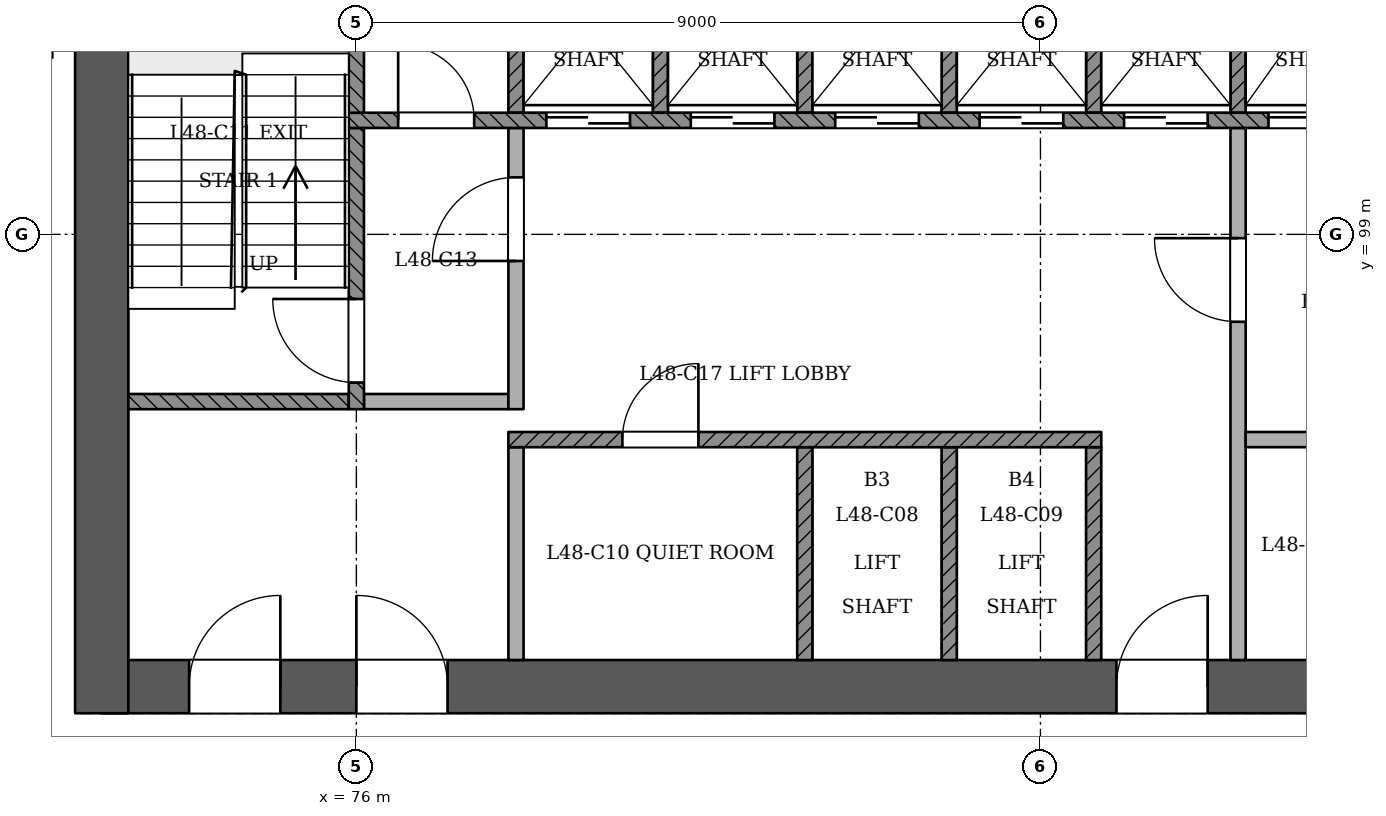
"""IFC4 building model, lengths in metres.
Left out: names, types, materials, properties, quantities, classifications, styles, units other than length and angle.
Written with IfcOpenShell. Run it as: python <this file> out.ifc"""

import sys

from ifc_helpers import new_model, si_unit, direction, frame, frame_2d, origin, place, context, subcontext, project, spatial, rectangle, extrude, element, fill, save


model = new_model("IFC4")
c1 = context("Model", 3, precision=1e-05, world=origin(), true_north=direction((0.0, 1.0)))
c2 = subcontext(c1, "Body", "Model", "MODEL_VIEW")
j1 = project(units=[si_unit("LENGTHUNIT", "METRE"), si_unit("PLANEANGLEUNIT", "RADIAN")], contexts=[c1])
p1 = place(None, origin())
s1 = spatial("IfcSite", under=j1, at=p1, CompositionType="ELEMENT")
p2 = place(p1, origin())
s2 = spatial("IfcBuilding", under=s1, at=p2, CompositionType="ELEMENT")
p3 = place(p2, frame((0.0, 0.0, 185.4)))
s3 = spatial("IfcBuildingStorey", under=s2, at=p3, CompositionType="ELEMENT", Elevation=185.4)
p4 = place(p3, frame((72.65, 93.05, 0.0), z_axis=(0.0, 0.0, 1.0), x_axis=(1.0, 0.0, 0.0)))
e1 = element("IfcWall", 1, at=p4, inside=s3, PredefinedType="SHEAR", context=c2, shape_type="SweptSolid", body=[
    extrude(rectangle(XDim=25.05, YDim=0.7, at=frame_2d((12.525, 0.0))), origin(), (0.0, 0.0, 1.0), 3.6),
])
p5 = place(p4, frame((1.15, 0.0, 0.0)))
e2 = element("IfcOpeningElement", 2, at=p5, cuts=e1, PredefinedType="OPENING", context=c2, shape_type="SweptSolid", body=[
    extrude(rectangle(XDim=1.2, YDim=2.1, at=frame_2d((0.6, 1.05))), frame((0.0, 0.36, 0.0), z_axis=(0.0, -1.0, 0.0), x_axis=(1.0, 0.0, 0.0)), (0.0, 0.0, 1.0), 0.721),
])
p6 = place(p4, frame((3.35, 0.0, 0.0)))
e3 = element("IfcOpeningElement", 3, at=p6, cuts=e1, PredefinedType="OPENING", context=c2, shape_type="SweptSolid", body=[
    extrude(rectangle(XDim=1.2, YDim=2.1, at=frame_2d((0.6, 1.05))), frame((0.0, 0.36, 0.0), z_axis=(0.0, -1.0, 0.0), x_axis=(1.0, 0.0, 0.0)), (0.0, 0.0, 1.0), 0.721),
])
p7 = place(p4, frame((13.35, 0.0, 0.0)))
e4 = element("IfcOpeningElement", 4, at=p7, cuts=e1, PredefinedType="OPENING", context=c2, shape_type="SweptSolid", body=[
    extrude(rectangle(XDim=1.2, YDim=2.1, at=frame_2d((0.6, 1.05))), frame((0.0, 0.36, 0.0), z_axis=(0.0, -1.0, 0.0), x_axis=(1.0, 0.0, 0.0)), (0.0, 0.0, 1.0), 0.721),
])
p8 = place(p4, frame((16.212, 0.0, 0.0)))
e5 = element("IfcOpeningElement", 5, at=p8, cuts=e1, PredefinedType="OPENING", context=c2, shape_type="SweptSolid", body=[
    extrude(rectangle(XDim=1.0, YDim=2.1, at=frame_2d((0.5, 1.05))), frame((0.0, 0.36, 0.0), z_axis=(0.0, -1.0, 0.0), x_axis=(1.0, 0.0, 0.0)), (0.0, 0.0, 1.0), 0.721),
])
p9 = place(p4, frame((19.65, 0.0, 0.0)))
e6 = element("IfcOpeningElement", 6, at=p9, cuts=e1, PredefinedType="OPENING", context=c2, shape_type="SweptSolid", body=[
    extrude(rectangle(XDim=1.0, YDim=2.1, at=frame_2d((0.5, 1.05))), frame((0.0, 0.36, 0.0), z_axis=(0.0, -1.0, 0.0), x_axis=(1.0, 0.0, 0.0)), (0.0, 0.0, 1.0), 0.721),
])
p10 = place(p4, frame((22.637, 0.0, 0.0)))
e7 = element("IfcOpeningElement", 7, at=p10, cuts=e1, PredefinedType="OPENING", context=c2, shape_type="SweptSolid", body=[
    extrude(rectangle(XDim=1.0, YDim=2.1, at=frame_2d((0.5, 1.05))), frame((0.0, 0.36, 0.0), z_axis=(0.0, -1.0, 0.0), x_axis=(1.0, 0.0, 0.0)), (0.0, 0.0, 1.0), 0.721),
])
p11 = place(p3, frame((72.65, 103.75, 0.0), z_axis=(0.0, 0.0, 1.0), x_axis=(0.0, -1.0, 0.0)))
e8 = element("IfcWall", 8, at=p11, inside=s3, PredefinedType="SHEAR", context=c2, shape_type="SweptSolid", body=[
    extrude(rectangle(XDim=11.05, YDim=0.7, at=frame_2d((5.525, 0.0))), origin(), (0.0, 0.0, 1.0), 3.6),
])
p12 = place(p3, frame((78.1, 93.4, 0.0), z_axis=(0.0, 0.0, 1.0), x_axis=(0.0, 1.0, 0.0)))
e9 = element("IfcWall", 9, at=p12, inside=s3, PredefinedType="PARTITIONING", context=c2, shape_type="SweptSolid", body=[
    extrude(rectangle(XDim=2.8, YDim=0.2, at=frame_2d((1.4, 0.0))), origin(), (0.0, 0.0, 1.0), 3.3),
])
for number, where, z_axis, x_axis in (
    (10, (81.9, 93.4, 0.0), (0.0, 0.0, 1.0), (0.0, 1.0, 0.0)),
    (11, (83.8, 93.4, 0.0), (0.0, 0.0, 1.0), (0.0, 1.0, 0.0)),
    (12, (85.7, 93.4, 0.0), (0.0, 0.0, 1.0), (0.0, 1.0, 0.0)),
):
    element("IfcWall", number, at=place(p3, frame(where, z_axis=z_axis, x_axis=x_axis)), inside=s3, PredefinedType="SOLIDWALL", context=c2, shape_type="SweptSolid", body=[
        extrude(rectangle(XDim=2.8, YDim=0.2, at=frame_2d((1.4, 0.0))), origin(), (0.0, 0.0, 1.0), 3.3),
    ])
p13 = place(p3, frame((87.6, 93.4, 0.0), z_axis=(0.0, 0.0, 1.0), x_axis=(0.0, 1.0, 0.0)))
e13 = element("IfcWall", 13, at=p13, inside=s3, PredefinedType="PARTITIONING", context=c2, shape_type="SweptSolid", body=[
    extrude(rectangle(XDim=7.0, YDim=0.2, at=frame_2d((3.5, 0.0))), origin(), (0.0, 0.0, 1.0), 3.3),
])
p14 = place(p13, frame((4.45, 0.0, 0.0)))
e14 = element("IfcOpeningElement", 14, at=p14, cuts=e13, PredefinedType="OPENING", context=c2, shape_type="SweptSolid", body=[
    extrude(rectangle(XDim=1.1, YDim=2.1, at=frame_2d((0.55, 1.05))), frame((0.0, 0.11, 0.0), z_axis=(0.0, -1.0, 0.0), x_axis=(1.0, 0.0, 0.0)), (0.0, 0.0, 1.0), 0.221),
])
p15 = place(p3, frame((78.0, 96.3, 0.0), z_axis=(0.0, 0.0, 1.0), x_axis=(1.0, 0.0, 0.0)))
e15 = element("IfcWall", 15, at=p15, inside=s3, PredefinedType="SOLIDWALL", context=c2, shape_type="SweptSolid", body=[
    extrude(rectangle(XDim=7.8, YDim=0.2, at=frame_2d((3.9, 0.0))), origin(), (0.0, 0.0, 1.0), 3.3),
])
p16 = place(p15, frame((1.5, 0.0, 0.0)))
e16 = element("IfcOpeningElement", 16, at=p16, cuts=e15, PredefinedType="OPENING", context=c2, shape_type="SweptSolid", body=[
    extrude(rectangle(XDim=1.0, YDim=2.1, at=frame_2d((0.5, 1.05))), frame((0.0, 0.11, 0.0), z_axis=(0.0, -1.0, 0.0), x_axis=(1.0, 0.0, 0.0)), (0.0, 0.0, 1.0), 0.221),
])
p17 = place(p3, frame((87.7, 96.3, 0.0), z_axis=(0.0, 0.0, 1.0), x_axis=(1.0, 0.0, 0.0)))
e17 = element("IfcWall", 17, at=p17, inside=s3, PredefinedType="PARTITIONING", context=c2, shape_type="SweptSolid", body=[
    extrude(rectangle(XDim=3.6, YDim=0.2, at=frame_2d((1.8, 0.0))), origin(), (0.0, 0.0, 1.0), 3.3),
])
p18 = place(p3, frame((73.0, 96.8, 0.0), z_axis=(0.0, 0.0, 1.0), x_axis=(1.0, 0.0, 0.0)))
e18 = element("IfcWall", 18, at=p18, inside=s3, PredefinedType="SOLIDWALL", context=c2, shape_type="SweptSolid", body=[
    extrude(rectangle(XDim=2.9, YDim=0.2, at=frame_2d((1.45, 0.0))), origin(), (0.0, 0.0, 1.0), 3.3),
])
p19 = place(p3, frame((76.0, 96.7, 0.0), z_axis=(0.0, 0.0, 1.0), x_axis=(0.0, 1.0, 0.0)))
e19 = element("IfcWall", 19, at=p19, inside=s3, PredefinedType="SOLIDWALL", context=c2, shape_type="SweptSolid", body=[
    extrude(rectangle(XDim=3.7, YDim=0.2, at=frame_2d((1.85, 0.0))), origin(), (0.0, 0.0, 1.0), 3.3),
])
p20 = place(p19, frame((0.35, 0.0, 0.0)))
e20 = element("IfcOpeningElement", 20, at=p20, cuts=e19, PredefinedType="OPENING", context=c2, shape_type="SweptSolid", body=[
    extrude(rectangle(XDim=1.1, YDim=2.1, at=frame_2d((0.55, 1.05))), frame((0.0, 0.11, 0.0), z_axis=(0.0, -1.0, 0.0), x_axis=(1.0, 0.0, 0.0)), (0.0, 0.0, 1.0), 0.221),
])
p21 = place(p3, frame((76.1, 96.8, 0.0), z_axis=(0.0, 0.0, 1.0), x_axis=(1.0, 0.0, 0.0)))
e21 = element("IfcWall", 21, at=p21, inside=s3, PredefinedType="PARTITIONING", context=c2, shape_type="SweptSolid", body=[
    extrude(rectangle(XDim=1.9, YDim=0.2, at=frame_2d((0.95, 0.0))), origin(), (0.0, 0.0, 1.0), 3.3),
])
p22 = place(p3, frame((78.1, 96.7, 0.0), z_axis=(0.0, 0.0, 1.0), x_axis=(0.0, 1.0, 0.0)))
e22 = element("IfcWall", 22, at=p22, inside=s3, PredefinedType="PARTITIONING", context=c2, shape_type="SweptSolid", body=[
    extrude(rectangle(XDim=3.7, YDim=0.2, at=frame_2d((1.85, 0.0))), origin(), (0.0, 0.0, 1.0), 3.3),
])
p23 = place(p22, frame((1.95, 0.0, 0.0)))
e23 = element("IfcOpeningElement", 23, at=p23, cuts=e22, PredefinedType="OPENING", context=c2, shape_type="SweptSolid", body=[
    extrude(rectangle(XDim=1.1, YDim=2.1, at=frame_2d((0.55, 1.05))), frame((0.0, 0.11, 0.0), z_axis=(0.0, -1.0, 0.0), x_axis=(1.0, 0.0, 0.0)), (0.0, 0.0, 1.0), 0.221),
])
p24 = place(p3, frame((75.9, 100.5, 0.0), z_axis=(0.0, 0.0, 1.0), x_axis=(1.0, 0.0, 0.0)))
e24 = element("IfcWall", 24, at=p24, inside=s3, PredefinedType="SOLIDWALL", context=c2, shape_type="SweptSolid", body=[
    extrude(rectangle(XDim=18.2, YDim=0.2, at=frame_2d((9.1, 0.0))), origin(), (0.0, 0.0, 1.0), 3.3),
])
p25 = place(p24, frame((2.6, 0.0, 0.0)))
e25 = element("IfcOpeningElement", 25, at=p25, cuts=e24, PredefinedType="OPENING", context=c2, shape_type="SweptSolid", body=[
    extrude(rectangle(XDim=1.1, YDim=2.1, at=frame_2d((0.55, 1.05))), frame((0.0, 0.11, 0.0), z_axis=(0.0, -1.0, 0.0), x_axis=(1.0, 0.0, 0.0)), (0.0, 0.0, 1.0), 0.221),
])
p26 = place(p24, frame((4.5, 0.0, 0.0)))
e26 = element("IfcOpeningElement", 26, at=p26, cuts=e24, PredefinedType="OPENING", context=c2, shape_type="SweptSolid", body=[
    extrude(rectangle(XDim=1.1, YDim=2.1, at=frame_2d((0.55, 1.05))), frame((0.0, 0.11, 0.0), z_axis=(0.0, -1.0, 0.0), x_axis=(1.0, 0.0, 0.0)), (0.0, 0.0, 1.0), 0.221),
])
p27 = place(p24, frame((6.4, 0.0, 0.0)))
e27 = element("IfcOpeningElement", 27, at=p27, cuts=e24, PredefinedType="OPENING", context=c2, shape_type="SweptSolid", body=[
    extrude(rectangle(XDim=1.1, YDim=2.1, at=frame_2d((0.55, 1.05))), frame((0.0, 0.11, 0.0), z_axis=(0.0, -1.0, 0.0), x_axis=(1.0, 0.0, 0.0)), (0.0, 0.0, 1.0), 0.221),
])
p28 = place(p24, frame((8.3, 0.0, 0.0)))
e28 = element("IfcOpeningElement", 28, at=p28, cuts=e24, PredefinedType="OPENING", context=c2, shape_type="SweptSolid", body=[
    extrude(rectangle(XDim=1.1, YDim=2.1, at=frame_2d((0.55, 1.05))), frame((0.0, 0.11, 0.0), z_axis=(0.0, -1.0, 0.0), x_axis=(1.0, 0.0, 0.0)), (0.0, 0.0, 1.0), 0.221),
])
p29 = place(p24, frame((10.2, 0.0, 0.0)))
e29 = element("IfcOpeningElement", 29, at=p29, cuts=e24, PredefinedType="OPENING", context=c2, shape_type="SweptSolid", body=[
    extrude(rectangle(XDim=1.1, YDim=2.1, at=frame_2d((0.55, 1.05))), frame((0.0, 0.11, 0.0), z_axis=(0.0, -1.0, 0.0), x_axis=(1.0, 0.0, 0.0)), (0.0, 0.0, 1.0), 0.221),
])
p30 = place(p24, frame((12.1, 0.0, 0.0)))
e30 = element("IfcOpeningElement", 30, at=p30, cuts=e24, PredefinedType="OPENING", context=c2, shape_type="SweptSolid", body=[
    extrude(rectangle(XDim=1.1, YDim=2.1, at=frame_2d((0.55, 1.05))), frame((0.0, 0.11, 0.0), z_axis=(0.0, -1.0, 0.0), x_axis=(1.0, 0.0, 0.0)), (0.0, 0.0, 1.0), 0.221),
])
p31 = place(p24, frame((14.0, 0.0, 0.0)))
e31 = element("IfcOpeningElement", 31, at=p31, cuts=e24, PredefinedType="OPENING", context=c2, shape_type="SweptSolid", body=[
    extrude(rectangle(XDim=1.1, YDim=2.1, at=frame_2d((0.55, 1.05))), frame((0.0, 0.11, 0.0), z_axis=(0.0, -1.0, 0.0), x_axis=(1.0, 0.0, 0.0)), (0.0, 0.0, 1.0), 0.221),
])
p32 = place(p24, frame((0.65, 0.0, 0.0)))
e32 = element("IfcOpeningElement", 32, at=p32, cuts=e24, PredefinedType="OPENING", context=c2, shape_type="SweptSolid", body=[
    extrude(rectangle(XDim=1.0, YDim=2.1, at=frame_2d((0.5, 1.05))), frame((0.0, 0.11, 0.0), z_axis=(0.0, -1.0, 0.0), x_axis=(1.0, 0.0, 0.0)), (0.0, 0.0, 1.0), 0.221),
])
p33 = place(p24, frame((16.3, 0.0, 0.0)))
e33 = element("IfcOpeningElement", 33, at=p33, cuts=e24, PredefinedType="OPENING", context=c2, shape_type="SweptSolid", body=[
    extrude(rectangle(XDim=1.0, YDim=2.1, at=frame_2d((0.5, 1.05))), frame((0.0, 0.11, 0.0), z_axis=(0.0, -1.0, 0.0), x_axis=(1.0, 0.0, 0.0)), (0.0, 0.0, 1.0), 0.221),
])
for number, where, z_axis, x_axis in (
    (34, (76.0, 100.6, 0.0), (0.0, 0.0, 1.0), (0.0, 1.0, 0.0)),
    (35, (78.1, 100.6, 0.0), (0.0, 0.0, 1.0), (0.0, 1.0, 0.0)),
    (36, (80.0, 100.6, 0.0), (0.0, 0.0, 1.0), (0.0, 1.0, 0.0)),
    (37, (81.9, 100.6, 0.0), (0.0, 0.0, 1.0), (0.0, 1.0, 0.0)),
    (38, (83.8, 100.6, 0.0), (0.0, 0.0, 1.0), (0.0, 1.0, 0.0)),
    (39, (85.7, 100.6, 0.0), (0.0, 0.0, 1.0), (0.0, 1.0, 0.0)),
    (40, (87.6, 100.6, 0.0), (0.0, 0.0, 1.0), (0.0, 1.0, 0.0)),
):
    element("IfcWall", number, at=place(p3, frame(where, z_axis=z_axis, x_axis=x_axis)), inside=s3, PredefinedType="SOLIDWALL", context=c2, shape_type="SweptSolid", body=[
        extrude(rectangle(XDim=2.8, YDim=0.2, at=frame_2d((1.4, 0.0))), origin(), (0.0, 0.0, 1.0), 3.3),
    ])
p34 = place(p25, origin())
e41 = element("IfcDoor", 41, at=p34, inside=s3, OperationType="SLIDING_TO_RIGHT", PredefinedType="NOTDEFINED", context=c2, shape_type="SweptSolid", body=[
    extrude(rectangle(XDim=1.1, YDim=2.1, at=frame_2d((0.55, 1.05))), frame((0.0, 0.025, 0.0), z_axis=(0.0, -1.0, 0.0), x_axis=(1.0, 0.0, 0.0)), (0.0, 0.0, 1.0), 0.05),
])
fill(e25, e41)
p35 = place(p26, origin())
e42 = element("IfcDoor", 42, at=p35, inside=s3, OperationType="SLIDING_TO_LEFT", PredefinedType="NOTDEFINED", context=c2, shape_type="SweptSolid", body=[
    extrude(rectangle(XDim=1.1, YDim=2.1, at=frame_2d((0.55, 1.05))), frame((0.0, 0.025, 0.0), z_axis=(0.0, -1.0, 0.0), x_axis=(1.0, 0.0, 0.0)), (0.0, 0.0, 1.0), 0.05),
])
fill(e26, e42)
p36 = place(p27, origin())
e43 = element("IfcDoor", 43, at=p36, inside=s3, OperationType="SLIDING_TO_RIGHT", PredefinedType="NOTDEFINED", context=c2, shape_type="SweptSolid", body=[
    extrude(rectangle(XDim=1.1, YDim=2.1, at=frame_2d((0.55, 1.05))), frame((0.0, 0.025, 0.0), z_axis=(0.0, -1.0, 0.0), x_axis=(1.0, 0.0, 0.0)), (0.0, 0.0, 1.0), 0.05),
])
fill(e27, e43)
p37 = place(p28, origin())
e44 = element("IfcDoor", 44, at=p37, inside=s3, OperationType="SLIDING_TO_LEFT", PredefinedType="NOTDEFINED", context=c2, shape_type="SweptSolid", body=[
    extrude(rectangle(XDim=1.1, YDim=2.1, at=frame_2d((0.55, 1.05))), frame((0.0, 0.025, 0.0), z_axis=(0.0, -1.0, 0.0), x_axis=(1.0, 0.0, 0.0)), (0.0, 0.0, 1.0), 0.05),
])
fill(e28, e44)
p38 = place(p29, origin())
e45 = element("IfcDoor", 45, at=p38, inside=s3, OperationType="SLIDING_TO_RIGHT", PredefinedType="NOTDEFINED", context=c2, shape_type="SweptSolid", body=[
    extrude(rectangle(XDim=1.1, YDim=2.1, at=frame_2d((0.55, 1.05))), frame((0.0, 0.025, 0.0), z_axis=(0.0, -1.0, 0.0), x_axis=(1.0, 0.0, 0.0)), (0.0, 0.0, 1.0), 0.05),
])
fill(e29, e45)
p39 = place(p30, origin())
e46 = element("IfcDoor", 46, at=p39, inside=s3, OperationType="SLIDING_TO_RIGHT", PredefinedType="NOTDEFINED", context=c2, shape_type="SweptSolid", body=[
    extrude(rectangle(XDim=1.1, YDim=2.1, at=frame_2d((0.55, 1.05))), frame((0.0, 0.025, 0.0), z_axis=(0.0, -1.0, 0.0), x_axis=(1.0, 0.0, 0.0)), (0.0, 0.0, 1.0), 0.05),
])
fill(e30, e46)
p40 = place(p20, origin())
e47 = element("IfcDoor", 47, at=p40, inside=s3, OperationType="SINGLE_SWING_RIGHT", PredefinedType="NOTDEFINED", context=c2, shape_type="SweptSolid", body=[
    extrude(rectangle(XDim=1.1, YDim=2.1, at=frame_2d((0.55, 1.05))), frame((0.0, 0.025, 0.0), z_axis=(0.0, -1.0, 0.0), x_axis=(1.0, 0.0, 0.0)), (0.0, 0.0, 1.0), 0.05),
])
fill(e20, e47)
p41 = place(p23, origin())
e48 = element("IfcDoor", 48, at=p41, inside=s3, OperationType="SINGLE_SWING_LEFT", PredefinedType="NOTDEFINED", context=c2, shape_type="SweptSolid", body=[
    extrude(rectangle(XDim=1.1, YDim=2.1, at=frame_2d((0.55, 1.05))), frame((0.0, 0.025, 0.0), z_axis=(0.0, -1.0, 0.0), x_axis=(1.0, 0.0, 0.0)), (0.0, 0.0, 1.0), 0.05),
])
fill(e23, e48)
p42 = place(p14, origin())
e49 = element("IfcDoor", 49, at=p42, inside=s3, OperationType="SINGLE_SWING_RIGHT", PredefinedType="NOTDEFINED", context=c2, shape_type="SweptSolid", body=[
    extrude(rectangle(XDim=1.1, YDim=2.1, at=frame_2d((0.55, 1.05))), frame((0.0, 0.025, 0.0), z_axis=(0.0, -1.0, 0.0), x_axis=(1.0, 0.0, 0.0)), (0.0, 0.0, 1.0), 0.05),
])
fill(e14, e49)
p43 = place(p5, origin())
e50 = element("IfcDoor", 50, at=p43, inside=s3, OperationType="SINGLE_SWING_RIGHT", PredefinedType="NOTDEFINED", context=c2, shape_type="SweptSolid", body=[
    extrude(rectangle(XDim=1.2, YDim=2.1, at=frame_2d((0.6, 1.05))), frame((0.0, 0.025, 0.0), z_axis=(0.0, -1.0, 0.0), x_axis=(1.0, 0.0, 0.0)), (0.0, 0.0, 1.0), 0.05),
])
fill(e2, e50)
p44 = place(p6, origin())
e51 = element("IfcDoor", 51, at=p44, inside=s3, OperationType="SINGLE_SWING_LEFT", PredefinedType="NOTDEFINED", context=c2, shape_type="SweptSolid", body=[
    extrude(rectangle(XDim=1.2, YDim=2.1, at=frame_2d((0.6, 1.05))), frame((0.0, 0.025, 0.0), z_axis=(0.0, -1.0, 0.0), x_axis=(1.0, 0.0, 0.0)), (0.0, 0.0, 1.0), 0.05),
])
fill(e3, e51)
p45 = place(p7, origin())
e52 = element("IfcDoor", 52, at=p45, inside=s3, OperationType="SINGLE_SWING_RIGHT", PredefinedType="NOTDEFINED", context=c2, shape_type="SweptSolid", body=[
    extrude(rectangle(XDim=1.2, YDim=2.1, at=frame_2d((0.6, 1.05))), frame((0.0, 0.025, 0.0), z_axis=(0.0, -1.0, 0.0), x_axis=(1.0, 0.0, 0.0)), (0.0, 0.0, 1.0), 0.05),
])
fill(e4, e52)
p46 = place(p32, origin())
e53 = element("IfcDoor", 53, at=p46, inside=s3, OperationType="SINGLE_SWING_LEFT", PredefinedType="NOTDEFINED", context=c2, shape_type="SweptSolid", body=[
    extrude(rectangle(XDim=1.0, YDim=2.1, at=frame_2d((0.5, 1.05))), frame((0.0, 0.025, 0.0), z_axis=(0.0, -1.0, 0.0), x_axis=(1.0, 0.0, 0.0)), (0.0, 0.0, 1.0), 0.05),
])
fill(e32, e53)
p47 = place(p16, origin())
e54 = element("IfcDoor", 54, at=p47, inside=s3, OperationType="SINGLE_SWING_RIGHT", PredefinedType="NOTDEFINED", context=c2, shape_type="SweptSolid", body=[
    extrude(rectangle(XDim=1.0, YDim=2.1, at=frame_2d((0.5, 1.05))), frame((0.0, 0.025, 0.0), z_axis=(0.0, -1.0, 0.0), x_axis=(1.0, 0.0, 0.0)), (0.0, 0.0, 1.0), 0.05),
])
fill(e16, e54)
save(model, sys.argv[1])
